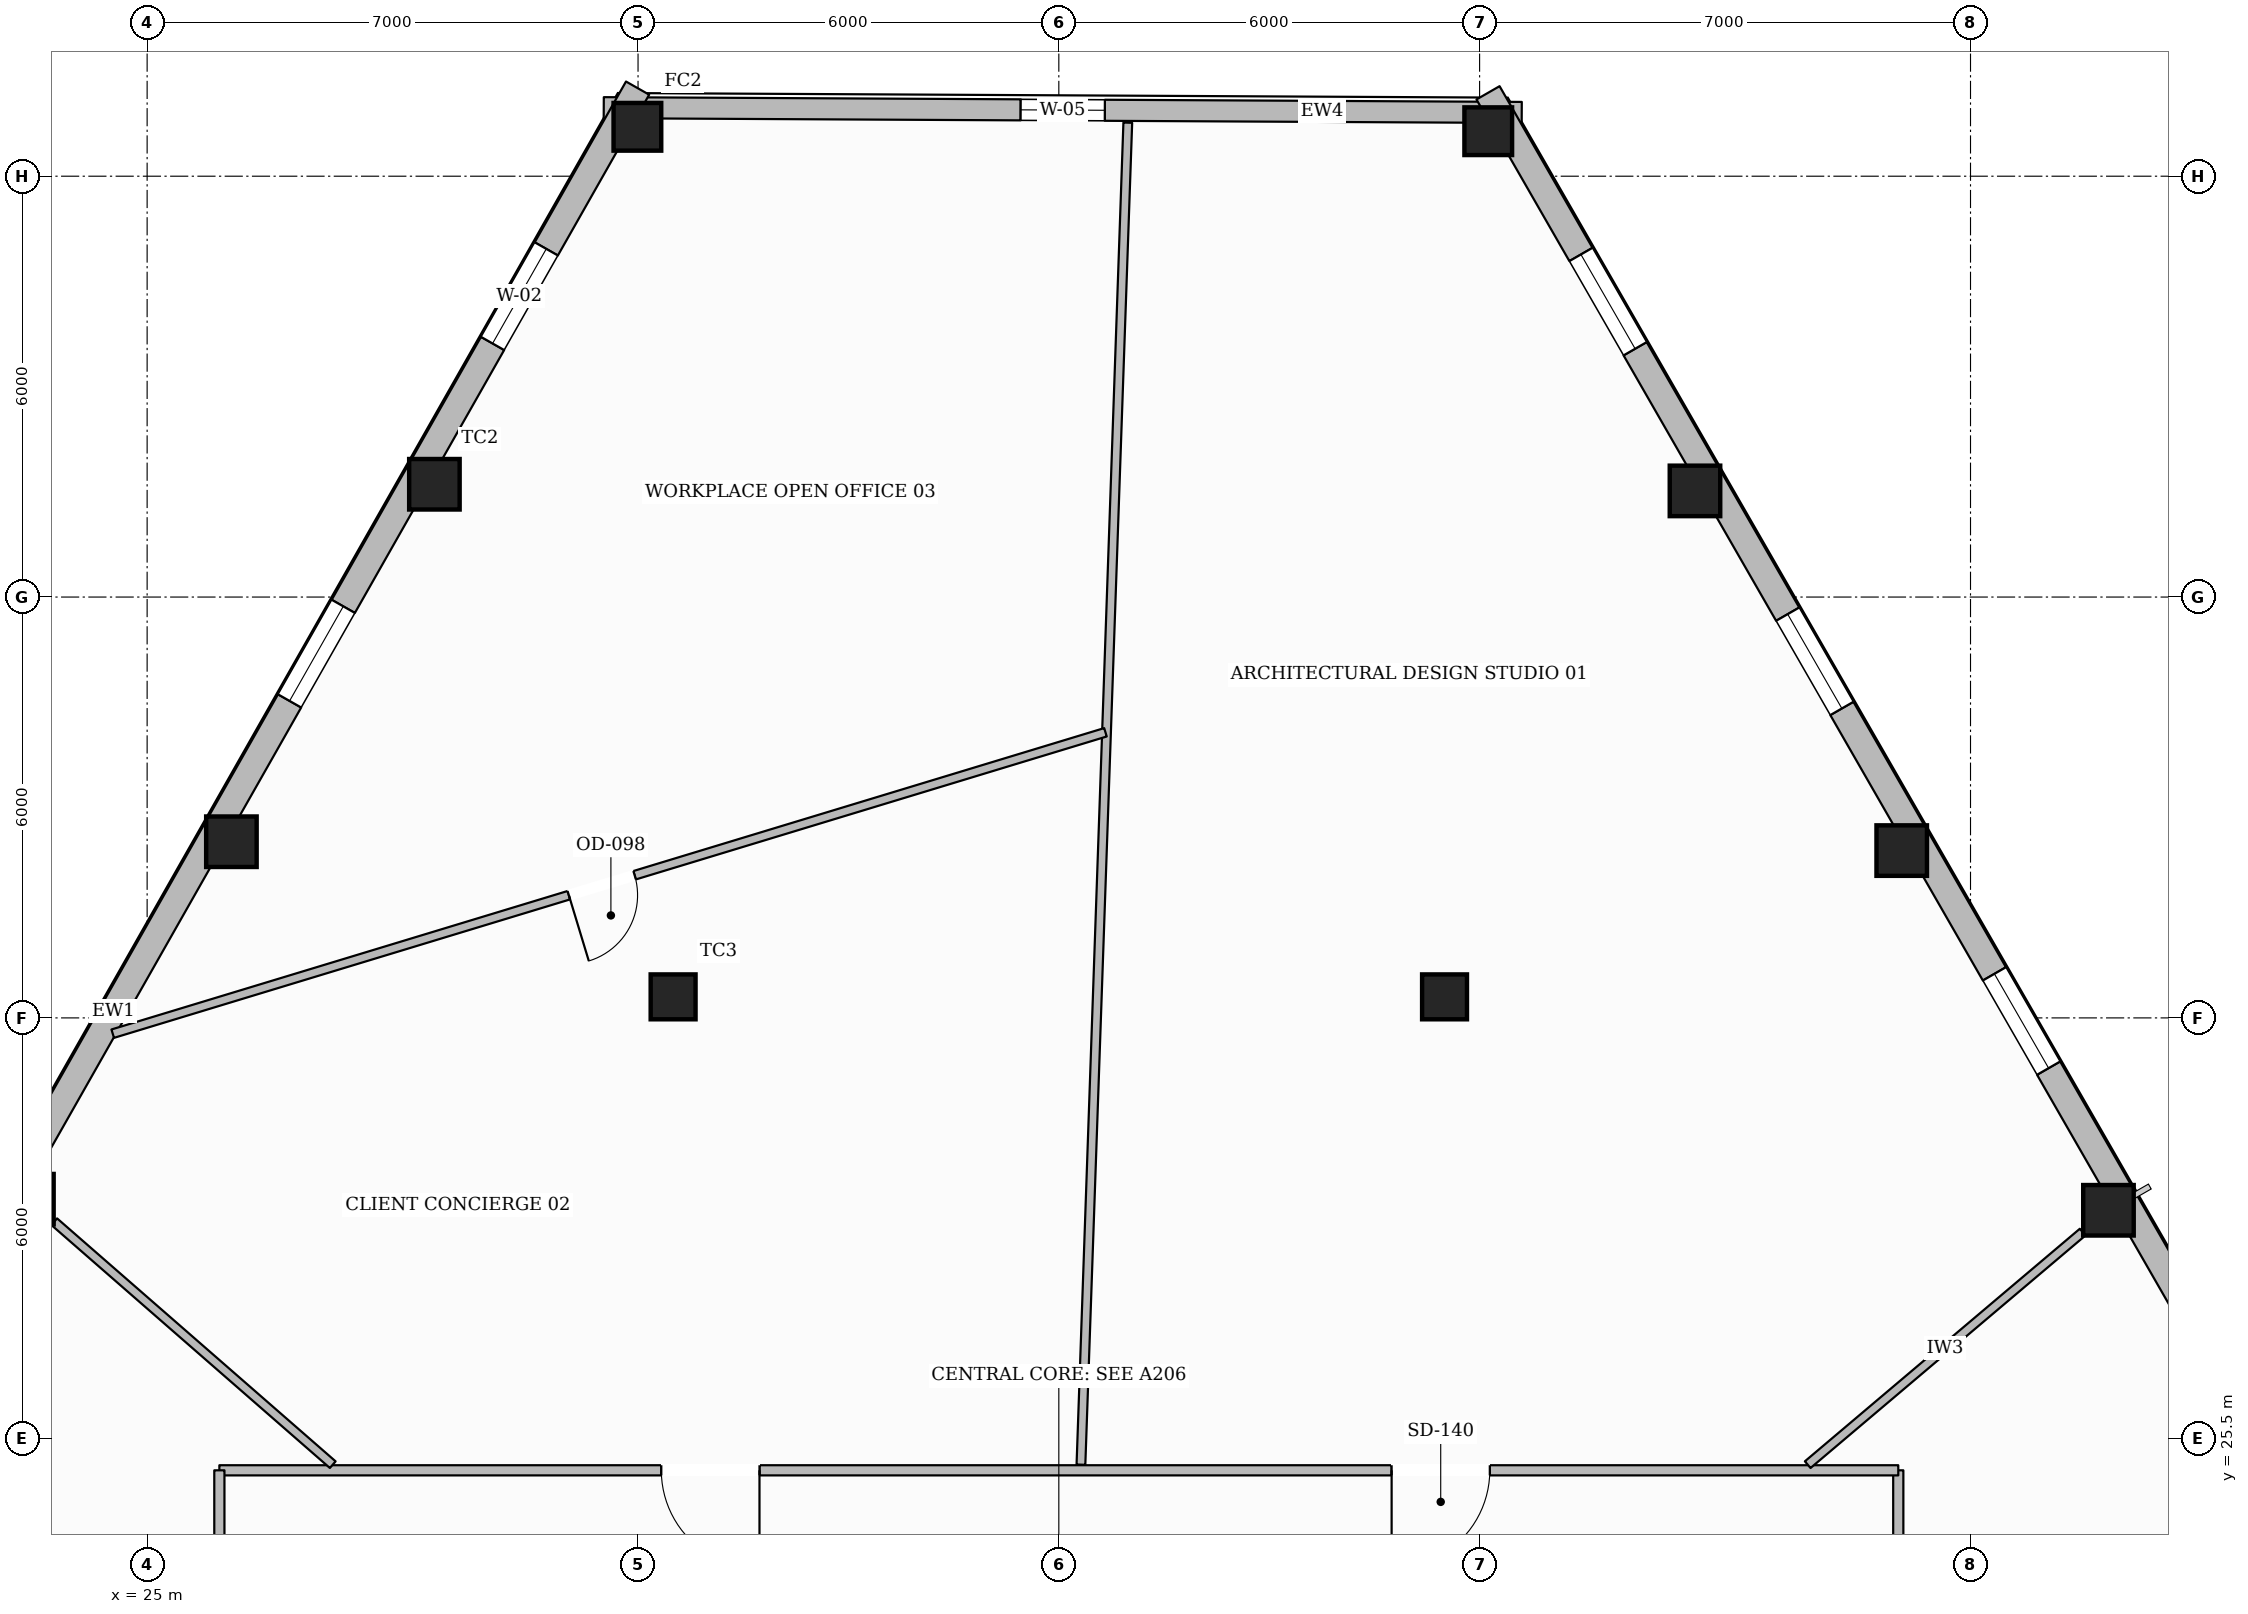
"""IFC4 building model, lengths in metres.
Left out: names, types, materials, properties, quantities, classifications, styles, units other than length and angle.
Written with IfcOpenShell. Run it as: python <this file> out.ifc"""

import sys

from ifc_helpers import new_model, si_unit, direction, frame, frame_2d, origin, origin_2d, place, context, subcontext, project, spatial, rectangle, hollow_rectangle, extrude, element, fill, save


model = new_model("IFC4")
c1 = context("Model", 3, precision=1e-05, world=origin(), true_north=direction((0.0, 1.0)))
c2 = subcontext(c1, "Body", "Model", "MODEL_VIEW")
j1 = project(units=[si_unit("LENGTHUNIT", "METRE"), si_unit("PLANEANGLEUNIT", "RADIAN")], contexts=[c1])
p1 = place(None, origin())
s1 = spatial("IfcSite", under=j1, at=p1, CompositionType="ELEMENT")
p2 = place(p1, origin())
s2 = spatial("IfcBuilding", under=s1, at=p2, CompositionType="ELEMENT")
p3 = place(p2, frame((0.0, 0.0, 104.75)))
s3 = spatial("IfcBuildingStorey", under=s2, at=p3, CompositionType="ELEMENT", Elevation=104.75)
p4 = place(p3, frame((31.991, 44.204, 0.0), z_axis=(0.0, 0.0, 1.0), x_axis=(1.0, 0.0, 0.0)))
e1 = element("IfcColumn", 1, at=p4, inside=s3, PredefinedType="COLUMN", context=c2, shape_type="SweptSolid", body=[
    extrude(hollow_rectangle(XDim=0.68, YDim=0.68, WallThickness=0.03, at=origin_2d()), origin(), (0.0, 0.0, 1.0), 3.6),
])
for number, where, z_axis, x_axis in (
    (2, (29.096, 39.108, 0.0), (0.0, 0.0, 1.0), (1.0, 0.0, 0.0)),
    (3, (26.202, 34.012, 0.0), (0.0, 0.0, 1.0), (1.0, 0.0, 0.0)),
    (4, (23.307, 28.915, 0.0), (0.0, 0.0, 1.0), (1.0, 0.0, 0.0)),
    (5, (52.967, 28.757, 0.0), (0.0, 0.0, 1.0), (1.0, 0.0, 0.0)),
    (6, (50.019, 33.885, 0.0), (0.0, 0.0, 1.0), (1.0, 0.0, 0.0)),
    (7, (47.071, 39.013, 0.0), (0.0, 0.0, 1.0), (1.0, 0.0, 0.0)),
):
    element("IfcColumn", number, at=place(p3, frame(where, z_axis=z_axis, x_axis=x_axis)), inside=s3, PredefinedType="COLUMN", context=c2, shape_type="SweptSolid", body=[
        extrude(hollow_rectangle(XDim=0.72, YDim=0.72, WallThickness=0.032, at=origin_2d()), origin(), (0.0, 0.0, 1.0), 3.6),
    ])
p5 = place(p3, frame((44.123, 44.142, 0.0), z_axis=(0.0, 0.0, 1.0), x_axis=(1.0, 0.0, 0.0)))
e8 = element("IfcColumn", 8, at=p5, inside=s3, PredefinedType="COLUMN", context=c2, shape_type="SweptSolid", body=[
    extrude(hollow_rectangle(XDim=0.68, YDim=0.68, WallThickness=0.03, at=origin_2d()), origin(), (0.0, 0.0, 1.0), 3.6),
])
for number, where, z_axis, x_axis in (
    (9, (32.5, 31.8, 0.0), (0.0, 0.0, 1.0), (1.0, 0.0, 0.0)),
    (10, (43.5, 31.8, 0.0), (0.0, 0.0, 1.0), (1.0, 0.0, 0.0)),
):
    element("IfcColumn", number, at=place(p3, frame(where, z_axis=z_axis, x_axis=x_axis)), inside=s3, PredefinedType="COLUMN", context=c2, shape_type="SweptSolid", body=[
        extrude(hollow_rectangle(XDim=0.64, YDim=0.64, WallThickness=0.028, at=origin_2d()), origin(), (0.0, 0.0, 1.0), 3.6),
    ])
p6 = place(p3, frame((31.511, 44.477, 0.0), z_axis=(0.0, 0.0, 1.0), x_axis=(0.999986654587, -0.005166299301, 0.0)))
e11 = element("IfcWall", 11, at=p6, inside=s3, PredefinedType="STANDARD", context=c2, shape_type="SweptSolid", body=[
    extrude(rectangle(XDim=13.09, YDim=0.3, at=frame_2d((6.545, 0.0))), origin(), (0.0, 0.0, 1.0), 3.059),
])
p7 = place(p6, frame((5.945, 0.0, 0.65)))
e12 = element("IfcOpeningElement", 12, at=p7, cuts=e11, PredefinedType="OPENING", context=c2, shape_type="SweptSolid", body=[
    extrude(rectangle(XDim=1.2, YDim=1.7, at=frame_2d((0.6, 0.85))), frame((0.0, 0.16, 0.0), z_axis=(0.0, -1.0, 0.0), x_axis=(1.0, 0.0, 0.0)), (0.0, 0.0, 1.0), 0.32),
])
p8 = place(p3, frame((14.155, 13.347, 0.0), z_axis=(0.0, 0.0, 1.0), x_axis=(0.493868426836, 0.869536644986, 0.0)))
e13 = element("IfcWall", 13, at=p8, inside=s3, PredefinedType="STANDARD", context=c2, shape_type="SweptSolid", body=[
    extrude(rectangle(XDim=36.121, YDim=0.38, at=frame_2d((18.061, 0.0))), origin(), (0.0, 0.0, 1.0), 3.059),
])
p9 = place(p8, frame((31.935, 0.0, 0.65)))
e14 = element("IfcOpeningElement", 14, at=p9, cuts=e13, PredefinedType="OPENING", context=c2, shape_type="SweptSolid", body=[
    extrude(rectangle(XDim=1.55, YDim=1.75, at=frame_2d((0.775, 0.875))), frame((0.0, 0.2, 0.0), z_axis=(0.0, -1.0, 0.0), x_axis=(1.0, 0.0, 0.0)), (0.0, 0.0, 1.0), 0.4),
])
p10 = place(p8, frame((26.073, 0.0, 0.65)))
e15 = element("IfcOpeningElement", 15, at=p10, cuts=e13, PredefinedType="OPENING", context=c2, shape_type="SweptSolid", body=[
    extrude(rectangle(XDim=1.55, YDim=1.75, at=frame_2d((0.775, 0.875))), frame((0.0, 0.2, 0.0), z_axis=(0.0, -1.0, 0.0), x_axis=(1.0, 0.0, 0.0)), (0.0, 0.0, 1.0), 0.4),
])
p11 = place(p8, frame((14.352, 0.0, 0.65)))
e16 = element("IfcOpeningElement", 16, at=p11, cuts=e13, PredefinedType="OPENING", context=c2, shape_type="SweptSolid", body=[
    extrude(rectangle(XDim=1.55, YDim=1.75, at=frame_2d((0.775, 0.875))), frame((0.0, 0.2, 0.0), z_axis=(0.0, -1.0, 0.0), x_axis=(1.0, 0.0, 0.0)), (0.0, 0.0, 1.0), 0.4),
])
p12 = place(p8, frame((8.491, 0.0, 0.65)))
e17 = element("IfcOpeningElement", 17, at=p12, cuts=e13, PredefinedType="OPENING", context=c2, shape_type="SweptSolid", body=[
    extrude(rectangle(XDim=1.55, YDim=1.75, at=frame_2d((0.775, 0.875))), frame((0.0, 0.2, 0.0), z_axis=(0.0, -1.0, 0.0), x_axis=(1.0, 0.0, 0.0)), (0.0, 0.0, 1.0), 0.4),
])
p13 = place(p8, frame((2.63, 0.0, 0.65)))
e18 = element("IfcOpeningElement", 18, at=p13, cuts=e13, PredefinedType="OPENING", context=c2, shape_type="SweptSolid", body=[
    extrude(rectangle(XDim=1.55, YDim=1.75, at=frame_2d((0.775, 0.875))), frame((0.0, 0.2, 0.0), z_axis=(0.0, -1.0, 0.0), x_axis=(1.0, 0.0, 0.0)), (0.0, 0.0, 1.0), 0.4),
])
p14 = place(p3, frame((44.12, 44.689, 0.0), z_axis=(0.0, 0.0, 1.0), x_axis=(0.498376840975, -0.866960509124, 0.0)))
e19 = element("IfcWall", 19, at=p14, inside=s3, PredefinedType="STANDARD", context=c2, shape_type="SweptSolid", body=[
    extrude(rectangle(XDim=36.441, YDim=0.38, at=frame_2d((18.22, 0.0))), origin(), (0.0, 0.0, 1.0), 3.059),
])
p15 = place(p14, frame((32.234, 0.0, 0.65)))
e20 = element("IfcOpeningElement", 20, at=p15, cuts=e19, PredefinedType="OPENING", context=c2, shape_type="SweptSolid", body=[
    extrude(rectangle(XDim=1.55, YDim=1.75, at=frame_2d((0.775, 0.875))), frame((0.0, 0.2, 0.0), z_axis=(0.0, -1.0, 0.0), x_axis=(1.0, 0.0, 0.0)), (0.0, 0.0, 1.0), 0.4),
])
p16 = place(p14, frame((26.319, 0.0, 0.65)))
e21 = element("IfcOpeningElement", 21, at=p16, cuts=e19, PredefinedType="OPENING", context=c2, shape_type="SweptSolid", body=[
    extrude(rectangle(XDim=1.55, YDim=1.75, at=frame_2d((0.775, 0.875))), frame((0.0, 0.2, 0.0), z_axis=(0.0, -1.0, 0.0), x_axis=(1.0, 0.0, 0.0)), (0.0, 0.0, 1.0), 0.4),
])
p17 = place(p14, frame((14.489, 0.0, 0.65)))
e22 = element("IfcOpeningElement", 22, at=p17, cuts=e19, PredefinedType="OPENING", context=c2, shape_type="SweptSolid", body=[
    extrude(rectangle(XDim=1.55, YDim=1.75, at=frame_2d((0.775, 0.875))), frame((0.0, 0.2, 0.0), z_axis=(0.0, -1.0, 0.0), x_axis=(1.0, 0.0, 0.0)), (0.0, 0.0, 1.0), 0.4),
])
p18 = place(p14, frame((8.573, 0.0, 0.65)))
e23 = element("IfcOpeningElement", 23, at=p18, cuts=e19, PredefinedType="OPENING", context=c2, shape_type="SweptSolid", body=[
    extrude(rectangle(XDim=1.55, YDim=1.75, at=frame_2d((0.775, 0.875))), frame((0.0, 0.2, 0.0), z_axis=(0.0, -1.0, 0.0), x_axis=(1.0, 0.0, 0.0)), (0.0, 0.0, 1.0), 0.4),
])
p19 = place(p14, frame((2.658, 0.0, 0.65)))
e24 = element("IfcOpeningElement", 24, at=p19, cuts=e19, PredefinedType="OPENING", context=c2, shape_type="SweptSolid", body=[
    extrude(rectangle(XDim=1.55, YDim=1.75, at=frame_2d((0.775, 0.875))), frame((0.0, 0.2, 0.0), z_axis=(0.0, -1.0, 0.0), x_axis=(1.0, 0.0, 0.0)), (0.0, 0.0, 1.0), 0.4),
])
p20 = place(p3, frame((49.97, 7.15, 0.0), z_axis=(0.0, 0.0, 1.0), x_axis=(0.0, 1.0, 0.0)))
e25 = element("IfcWall", 25, at=p20, inside=s3, PredefinedType="PARTITIONING", context=c2, shape_type="SweptSolid", body=[
    extrude(rectangle(XDim=17.9, YDim=0.145, at=frame_2d((8.95, 0.0))), origin(), (0.0, 0.0, 1.0), 3.288),
])
p21 = place(p20, frame((8.25, 0.0, 0.0)))
e26 = element("IfcOpeningElement", 26, at=p21, cuts=e25, PredefinedType="OPENING", context=c2, shape_type="SweptSolid", body=[
    extrude(rectangle(XDim=1.4, YDim=2.2, at=frame_2d((0.7, 1.1))), frame((0.0, 0.083, 0.0), z_axis=(0.0, -1.0, 0.0), x_axis=(1.0, 0.0, 0.0)), (0.0, 0.0, 1.0), 0.165),
])
p22 = place(p3, frame((49.97, 25.05, 0.0), z_axis=(0.0, 0.0, 1.0), x_axis=(-1.0, 0.0, 0.0)))
e27 = element("IfcWall", 27, at=p22, inside=s3, PredefinedType="PARTITIONING", context=c2, shape_type="SweptSolid", body=[
    extrude(rectangle(XDim=23.94, YDim=0.145, at=frame_2d((11.97, 0.0))), origin(), (0.0, 0.0, 1.0), 3.6),
])
p23 = place(p22, frame((5.824, 0.0, 0.0)))
e28 = element("IfcOpeningElement", 28, at=p23, cuts=e27, PredefinedType="OPENING", context=c2, shape_type="SweptSolid", body=[
    extrude(rectangle(XDim=1.4, YDim=2.2, at=frame_2d((0.7, 1.1))), frame((0.0, 0.083, 0.0), z_axis=(0.0, -1.0, 0.0), x_axis=(1.0, 0.0, 0.0)), (0.0, 0.0, 1.0), 0.165),
])
p24 = place(p22, frame((16.238, 0.0, 0.0)))
e29 = element("IfcOpeningElement", 29, at=p24, cuts=e27, PredefinedType="OPENING", context=c2, shape_type="SweptSolid", body=[
    extrude(rectangle(XDim=1.4, YDim=2.2, at=frame_2d((0.7, 1.1))), frame((0.0, 0.083, 0.0), z_axis=(0.0, -1.0, 0.0), x_axis=(1.0, 0.0, 0.0)), (0.0, 0.0, 1.0), 0.165),
])
p25 = place(p3, frame((26.03, 25.05, 0.0), z_axis=(0.0, 0.0, 1.0), x_axis=(0.0, -1.0, 0.0)))
e30 = element("IfcWall", 30, at=p25, inside=s3, PredefinedType="PARTITIONING", context=c2, shape_type="SweptSolid", body=[
    extrude(rectangle(XDim=17.9, YDim=0.145, at=frame_2d((8.95, 0.0))), origin(), (0.0, 0.0, 1.0), 3.288),
])
p26 = place(p25, frame((7.016, 0.0, 0.0)))
e31 = element("IfcOpeningElement", 31, at=p26, cuts=e30, PredefinedType="OPENING", context=c2, shape_type="SweptSolid", body=[
    extrude(rectangle(XDim=1.4, YDim=2.2, at=frame_2d((0.7, 1.1))), frame((0.0, 0.083, 0.0), z_axis=(0.0, -1.0, 0.0), x_axis=(1.0, 0.0, 0.0)), (0.0, 0.0, 1.0), 0.165),
])
p27 = place(p3, frame((48.679, 25.131, 0.0), z_axis=(0.0, 0.0, 1.0), x_axis=(0.763563012799, 0.645733323815, 0.0)))
e32 = element("IfcWall", 32, at=p27, inside=s3, PredefinedType="PARTITIONING", context=c2, shape_type="SweptSolid", body=[
    extrude(rectangle(XDim=5.134, YDim=0.125, at=frame_2d((2.567, 0.0))), origin(), (0.0, 0.0, 1.0), 3.141),
])
p28 = place(p3, frame((38.315, 25.131, 0.0), z_axis=(0.0, 0.0, 1.0), x_axis=(0.03489139659, 0.999391109848, 0.0)))
e33 = element("IfcWall", 33, at=p28, inside=s3, PredefinedType="PARTITIONING", context=c2, shape_type="SweptSolid", body=[
    extrude(rectangle(XDim=19.144, YDim=0.125, at=frame_2d((9.572, 0.0))), origin(), (0.0, 0.0, 1.0), 3.6),
])
p29 = place(p3, frame((27.646, 25.131, 0.0), z_axis=(0.0, 0.0, 1.0), x_axis=(-0.753603237889, 0.657329567145, 0.0)))
e34 = element("IfcWall", 34, at=p29, inside=s3, PredefinedType="PARTITIONING", context=c2, shape_type="SweptSolid", body=[
    extrude(rectangle(XDim=5.27, YDim=0.125, at=frame_2d((2.635, 0.0))), origin(), (0.0, 0.0, 1.0), 3.141),
])
p30 = place(p3, frame((38.665, 35.572, 0.0), z_axis=(0.0, 0.0, 1.0), x_axis=(-0.956891470712, -0.290445714856, 0.0)))
e35 = element("IfcWall", 35, at=p30, inside=s3, PredefinedType="PARTITIONING", context=c2, shape_type="SweptSolid", body=[
    extrude(rectangle(XDim=14.793, YDim=0.125, at=frame_2d((7.396, 0.0))), origin(), (0.0, 0.0, 1.0), 3.288),
])
p31 = place(p30, frame((7.016, 0.0, 0.0)))
e36 = element("IfcOpeningElement", 36, at=p31, cuts=e35, PredefinedType="OPENING", context=c2, shape_type="SweptSolid", body=[
    extrude(rectangle(XDim=0.98, YDim=2.15, at=frame_2d((0.49, 1.075))), frame((0.0, 0.073, 0.0), z_axis=(0.0, -1.0, 0.0), x_axis=(1.0, 0.0, 0.0)), (0.0, 0.0, 1.0), 0.145),
])
p32 = place(p9, origin())
e37 = element("IfcWindow", 37, at=p32, inside=s3, PartitioningType="SINGLE_PANEL", PredefinedType="WINDOW", context=c2, shape_type="SweptSolid", body=[
    extrude(rectangle(XDim=1.55, YDim=1.75, at=frame_2d((0.775, 0.875))), frame((0.0, 0.03, 0.0), z_axis=(0.0, -1.0, 0.0), x_axis=(1.0, 0.0, 0.0)), (0.0, 0.0, 1.0), 0.06),
])
fill(e14, e37)
p33 = place(p10, origin())
e38 = element("IfcWindow", 38, at=p33, inside=s3, PartitioningType="SINGLE_PANEL", PredefinedType="WINDOW", context=c2, shape_type="SweptSolid", body=[
    extrude(rectangle(XDim=1.55, YDim=1.75, at=frame_2d((0.775, 0.875))), frame((0.0, 0.03, 0.0), z_axis=(0.0, -1.0, 0.0), x_axis=(1.0, 0.0, 0.0)), (0.0, 0.0, 1.0), 0.06),
])
fill(e15, e38)
p34 = place(p17, origin())
e39 = element("IfcWindow", 39, at=p34, inside=s3, PartitioningType="SINGLE_PANEL", PredefinedType="WINDOW", context=c2, shape_type="SweptSolid", body=[
    extrude(rectangle(XDim=1.55, YDim=1.75, at=frame_2d((0.775, 0.875))), frame((0.0, 0.03, 0.0), z_axis=(0.0, -1.0, 0.0), x_axis=(1.0, 0.0, 0.0)), (0.0, 0.0, 1.0), 0.06),
])
fill(e22, e39)
p35 = place(p18, origin())
e40 = element("IfcWindow", 40, at=p35, inside=s3, PartitioningType="SINGLE_PANEL", PredefinedType="WINDOW", context=c2, shape_type="SweptSolid", body=[
    extrude(rectangle(XDim=1.55, YDim=1.75, at=frame_2d((0.775, 0.875))), frame((0.0, 0.03, 0.0), z_axis=(0.0, -1.0, 0.0), x_axis=(1.0, 0.0, 0.0)), (0.0, 0.0, 1.0), 0.06),
])
fill(e23, e40)
p36 = place(p19, origin())
e41 = element("IfcWindow", 41, at=p36, inside=s3, PartitioningType="SINGLE_PANEL", PredefinedType="WINDOW", context=c2, shape_type="SweptSolid", body=[
    extrude(rectangle(XDim=1.55, YDim=1.75, at=frame_2d((0.775, 0.875))), frame((0.0, 0.03, 0.0), z_axis=(0.0, -1.0, 0.0), x_axis=(1.0, 0.0, 0.0)), (0.0, 0.0, 1.0), 0.06),
])
fill(e24, e41)
p37 = place(p7, origin())
e42 = element("IfcWindow", 42, at=p37, inside=s3, PartitioningType="SINGLE_PANEL", PredefinedType="WINDOW", context=c2, shape_type="SweptSolid", body=[
    extrude(rectangle(XDim=1.2, YDim=1.7, at=frame_2d((0.6, 0.85))), frame((0.0, 0.03, 0.0), z_axis=(0.0, -1.0, 0.0), x_axis=(1.0, 0.0, 0.0)), (0.0, 0.0, 1.0), 0.06),
])
fill(e12, e42)
p38 = place(p23, origin())
e43 = element("IfcDoor", 43, at=p38, inside=s3, OperationType="SINGLE_SWING_RIGHT", PredefinedType="DOOR", context=c2, shape_type="SweptSolid", body=[
    extrude(rectangle(XDim=1.4, YDim=2.2, at=frame_2d((0.7, 1.1))), frame((0.0, 0.025, 0.0), z_axis=(0.0, -1.0, 0.0), x_axis=(1.0, 0.0, 0.0)), (0.0, 0.0, 1.0), 0.05),
])
fill(e28, e43)
p39 = place(p24, origin())
e44 = element("IfcDoor", 44, at=p39, inside=s3, OperationType="SINGLE_SWING_LEFT", PredefinedType="DOOR", context=c2, shape_type="SweptSolid", body=[
    extrude(rectangle(XDim=1.4, YDim=2.2, at=frame_2d((0.7, 1.1))), frame((0.0, 0.025, 0.0), z_axis=(0.0, -1.0, 0.0), x_axis=(1.0, 0.0, 0.0)), (0.0, 0.0, 1.0), 0.05),
])
fill(e29, e44)
p40 = place(p31, origin())
e45 = element("IfcDoor", 45, at=p40, inside=s3, OperationType="SINGLE_SWING_RIGHT", PredefinedType="DOOR", context=c2, shape_type="SweptSolid", body=[
    extrude(rectangle(XDim=0.98, YDim=2.15, at=frame_2d((0.49, 1.075))), frame((0.0, 0.025, 0.0), z_axis=(0.0, -1.0, 0.0), x_axis=(1.0, 0.0, 0.0)), (0.0, 0.0, 1.0), 0.05),
])
fill(e36, e45)
save(model, sys.argv[1])
